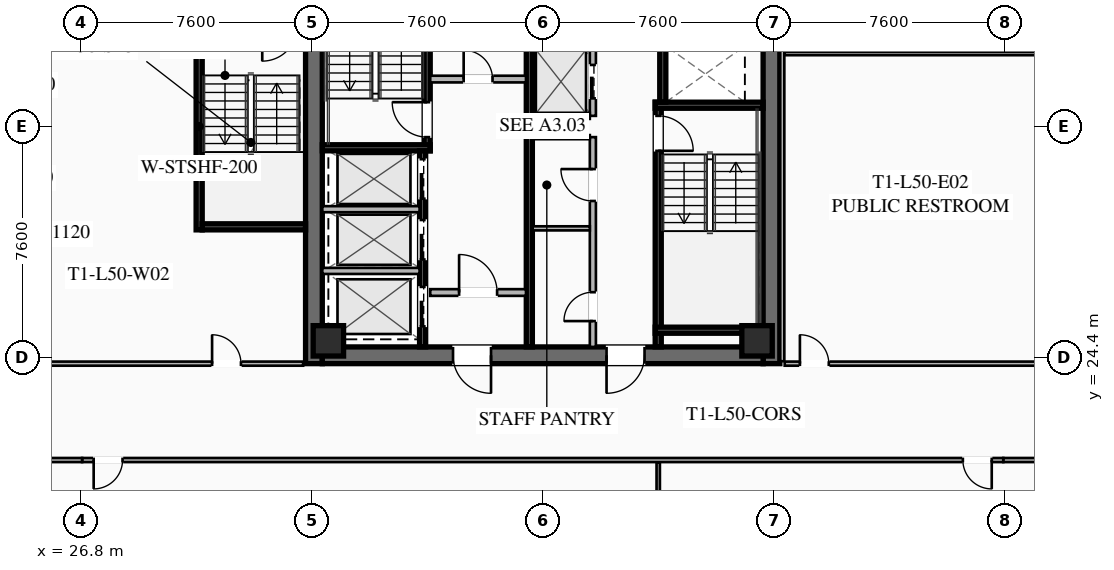
"""IFC4 building model, lengths in metres.
Left out: names, types, materials, properties, quantities, classifications, styles, units other than length and angle.
Written with IfcOpenShell. Run it as: python <this file> out.ifc"""

import sys

from ifc_helpers import new_model, si_unit, direction, frame, frame_2d, origin, origin_2d, place, context, subcontext, project, spatial, rectangle, hollow_rectangle, extrude, element, fill, save


model = new_model("IFC4")
c1 = context("Model", 3, precision=1e-05, world=origin(), true_north=direction((0.0, 1.0)))
c2 = subcontext(c1, "Body", "Model", "MODEL_VIEW")
j1 = project(units=[si_unit("LENGTHUNIT", "METRE"), si_unit("PLANEANGLEUNIT", "RADIAN")], contexts=[c1])
p1 = place(None, origin())
s1 = spatial("IfcSite", under=j1, at=p1, CompositionType="ELEMENT")
p2 = place(p1, origin())
s2 = spatial("IfcBuilding", under=s1, at=p2, CompositionType="ELEMENT")
p3 = place(p2, frame((0.0, 0.0, 185.4)))
s3 = spatial("IfcBuildingStorey", under=s2, at=p3, CompositionType="ELEMENT", Elevation=185.4)
for number, where, z_axis, x_axis in (
    (1, (34.475, 24.2, 0.0), (0.0, 0.0, 1.0), (0.0, 1.0, 0.0)),
    (2, (49.525, 39.8, 0.0), (0.0, 0.0, 1.0), (0.0, -1.0, 0.0)),
):
    element("IfcWall", number, at=place(p3, frame(where, z_axis=z_axis, x_axis=x_axis)), inside=s3, PredefinedType="SHEAR", context=c2, shape_type="SweptSolid", body=[
        extrude(rectangle(XDim=15.6, YDim=0.55, at=frame_2d((7.8, 0.0))), origin(), (0.0, 0.0, 1.0), 3.55),
    ])
p4 = place(p3, frame((49.25, 24.475, 0.0), z_axis=(0.0, 0.0, 1.0), x_axis=(-1.0, 0.0, 0.0)))
e3 = element("IfcWall", 3, at=p4, inside=s3, PredefinedType="SHEAR", context=c2, shape_type="SweptSolid", body=[
    extrude(rectangle(XDim=14.5, YDim=0.55, at=frame_2d((7.25, 0.0))), origin(), (0.0, 0.0, 1.0), 3.55),
])
p5 = place(p4, frame((8.95, 0.0, 0.0)))
e4 = element("IfcOpeningElement", 4, at=p5, cuts=e3, PredefinedType="OPENING", context=c2, shape_type="SweptSolid", body=[
    extrude(rectangle(XDim=1.25, YDim=2.25, at=frame_2d((0.625, 1.125))), frame((0.0, 0.285, 0.0), z_axis=(0.0, -1.0, 0.0), x_axis=(1.0, 0.0, 0.0)), (0.0, 0.0, 1.0), 0.57),
])
p6 = place(p4, frame((3.9, 0.0, 0.0)))
e5 = element("IfcOpeningElement", 5, at=p6, cuts=e3, PredefinedType="OPENING", context=c2, shape_type="SweptSolid", body=[
    extrude(rectangle(XDim=1.25, YDim=2.25, at=frame_2d((0.625, 1.125))), frame((0.0, 0.285, 0.0), z_axis=(0.0, -1.0, 0.0), x_axis=(1.0, 0.0, 0.0)), (0.0, 0.0, 1.0), 0.57),
])
for number, where, z_axis, x_axis in (
    (6, (34.95, 24.95, 0.0), (0.0, 0.0, 1.0), (1.0, 0.0, 0.0)),
    (7, (49.05, 24.95, 0.0), (0.0, 0.0, 1.0), (1.0, 0.0, 0.0)),
):
    element("IfcColumn", number, at=place(p3, frame(where, z_axis=z_axis, x_axis=x_axis)), inside=s3, PredefinedType="COLUMN", context=c2, shape_type="SweptSolid", body=[
        extrude(hollow_rectangle(XDim=1.0, YDim=1.0, WallThickness=0.04, at=origin_2d()), origin(), (0.0, 0.0, 1.0), 3.37),
    ])
p7 = place(p3, frame((38.2, 31.2, 0.0), z_axis=(0.0, 0.0, 1.0), x_axis=(0.0, 1.0, 0.0)))
e8 = element("IfcWall", 8, at=p7, inside=s3, PredefinedType="SHEAR", context=c2, shape_type="SweptSolid", body=[
    extrude(rectangle(XDim=8.05, YDim=0.2, at=frame_2d((4.025, 0.0))), origin(), (0.0, 0.0, 1.0), 3.37),
])
p8 = place(p7, frame((0.45, 0.0, 0.0)))
e9 = element("IfcOpeningElement", 9, at=p8, cuts=e8, PredefinedType="OPENING", context=c2, shape_type="SweptSolid", body=[
    extrude(rectangle(XDim=1.15, YDim=2.2, at=frame_2d((0.575, 1.1))), frame((0.0, 0.11, 0.0), z_axis=(0.0, -1.0, 0.0), x_axis=(1.0, 0.0, 0.0)), (0.0, 0.0, 1.0), 0.22),
])
p9 = place(p3, frame((34.75, 31.3, 0.0), z_axis=(0.0, 0.0, 1.0), x_axis=(1.0, 0.0, 0.0)))
e10 = element("IfcWall", 10, at=p9, inside=s3, PredefinedType="SHEAR", context=c2, shape_type="SweptSolid", body=[
    extrude(rectangle(XDim=3.55, YDim=0.2, at=frame_2d((1.775, 0.0))), origin(), (0.0, 0.0, 1.0), 3.37),
])
p10 = place(p3, frame((45.8, 32.8, 0.0), z_axis=(0.0, 0.0, 1.0), x_axis=(0.0, -1.0, 0.0)))
e11 = element("IfcWall", 11, at=p10, inside=s3, PredefinedType="SHEAR", context=c2, shape_type="SweptSolid", body=[
    extrude(rectangle(XDim=8.05, YDim=0.2, at=frame_2d((4.025, 0.0))), origin(), (0.0, 0.0, 1.0), 3.37),
])
p11 = place(p10, frame((0.45, 0.0, 0.0)))
e12 = element("IfcOpeningElement", 12, at=p11, cuts=e11, PredefinedType="OPENING", context=c2, shape_type="SweptSolid", body=[
    extrude(rectangle(XDim=1.15, YDim=2.2, at=frame_2d((0.575, 1.1))), frame((0.0, 0.11, 0.0), z_axis=(0.0, -1.0, 0.0), x_axis=(1.0, 0.0, 0.0)), (0.0, 0.0, 1.0), 0.22),
])
for number, where, z_axis, x_axis in (
    (13, (45.7, 32.7, 0.0), (0.0, 0.0, 1.0), (1.0, 0.0, 0.0)),
    (14, (45.7, 25.3, 0.0), (0.0, 0.0, 1.0), (1.0, 0.0, 0.0)),
):
    element("IfcWall", number, at=place(p3, frame(where, z_axis=z_axis, x_axis=x_axis)), inside=s3, PredefinedType="SHEAR", context=c2, shape_type="SweptSolid", body=[
        extrude(rectangle(XDim=3.55, YDim=0.2, at=frame_2d((1.775, 0.0))), origin(), (0.0, 0.0, 1.0), 3.37),
    ])
p12 = place(p3, frame((41.56, 24.75, 0.0), z_axis=(0.0, 0.0, 1.0), x_axis=(0.0, 1.0, 0.0)))
e15 = element("IfcWall", 15, at=p12, inside=s3, PredefinedType="SHEAR", context=c2, shape_type="SweptSolid", body=[
    extrude(rectangle(XDim=14.5, YDim=0.2, at=frame_2d((7.25, 0.0))), origin(), (0.0, 0.0, 1.0), 3.37),
])
p13 = place(p3, frame((38.3, 33.56, 0.0), z_axis=(0.0, 0.0, 1.0), x_axis=(1.0, 0.0, 0.0)))
e16 = element("IfcWall", 16, at=p13, inside=s3, PredefinedType="SOLIDWALL", context=c2, shape_type="SweptSolid", body=[
    extrude(rectangle(XDim=3.15, YDim=0.22, at=frame_2d((1.575, 0.0))), origin(), (0.0, 0.0, 1.0), 2.723),
])
p14 = place(p13, frame((1.1, 0.0, 0.0)))
e17 = element("IfcOpeningElement", 17, at=p14, cuts=e16, PredefinedType="OPENING", context=c2, shape_type="SweptSolid", body=[
    extrude(rectangle(XDim=0.95, YDim=2.05, at=frame_2d((0.475, 1.025))), frame((0.0, 0.12, 0.0), z_axis=(0.0, -1.0, 0.0), x_axis=(1.0, 0.0, 0.0)), (0.0, 0.0, 1.0), 0.24),
])
p15 = place(p3, frame((38.3, 26.54, 0.0), z_axis=(0.0, 0.0, 1.0), x_axis=(1.0, 0.0, 0.0)))
e18 = element("IfcWall", 18, at=p15, inside=s3, PredefinedType="SOLIDWALL", context=c2, shape_type="SweptSolid", body=[
    extrude(rectangle(XDim=3.15, YDim=0.22, at=frame_2d((1.575, 0.0))), origin(), (0.0, 0.0, 1.0), 2.723),
])
p16 = place(p15, frame((0.95, 0.0, 0.0)))
e19 = element("IfcOpeningElement", 19, at=p16, cuts=e18, PredefinedType="OPENING", context=c2, shape_type="SweptSolid", body=[
    extrude(rectangle(XDim=1.25, YDim=2.25, at=frame_2d((0.625, 1.125))), frame((0.0, 0.12, 0.0), z_axis=(0.0, -1.0, 0.0), x_axis=(1.0, 0.0, 0.0)), (0.0, 0.0, 1.0), 0.24),
])
p17 = place(p3, frame((38.05, 24.75, 0.0), z_axis=(0.0, 0.0, 1.0), x_axis=(0.0, 1.0, 0.0)))
e20 = element("IfcWall", 20, at=p17, inside=s3, PredefinedType="SHEAR", context=c2, shape_type="SweptSolid", body=[
    extrude(rectangle(XDim=6.45, YDim=0.2, at=frame_2d((3.225, 0.0))), origin(), (0.0, 0.0, 1.0), 3.37),
])
p18 = place(p17, frame((4.875, 0.0, 0.0)))
e21 = element("IfcOpeningElement", 21, at=p18, cuts=e20, PredefinedType="OPENING", context=c2, shape_type="SweptSolid", body=[
    extrude(rectangle(XDim=1.3, YDim=2.25, at=frame_2d((0.65, 1.125))), frame((0.0, 0.11, 0.0), z_axis=(0.0, -1.0, 0.0), x_axis=(1.0, 0.0, 0.0)), (0.0, 0.0, 1.0), 0.22),
])
p19 = place(p17, frame((2.875, 0.0, 0.0)))
e22 = element("IfcOpeningElement", 22, at=p19, cuts=e20, PredefinedType="OPENING", context=c2, shape_type="SweptSolid", body=[
    extrude(rectangle(XDim=1.3, YDim=2.25, at=frame_2d((0.65, 1.125))), frame((0.0, 0.11, 0.0), z_axis=(0.0, -1.0, 0.0), x_axis=(1.0, 0.0, 0.0)), (0.0, 0.0, 1.0), 0.22),
])
p20 = place(p17, frame((0.675, 0.0, 0.0)))
e23 = element("IfcOpeningElement", 23, at=p20, cuts=e20, PredefinedType="OPENING", context=c2, shape_type="SweptSolid", body=[
    extrude(rectangle(XDim=1.3, YDim=2.25, at=frame_2d((0.65, 1.125))), frame((0.0, 0.11, 0.0), z_axis=(0.0, -1.0, 0.0), x_axis=(1.0, 0.0, 0.0)), (0.0, 0.0, 1.0), 0.22),
])
for number, where, z_axis, x_axis in (
    (24, (34.75, 27.25, 0.0), (0.0, 0.0, 1.0), (1.0, 0.0, 0.0)),
    (25, (34.75, 29.28, 0.0), (0.0, 0.0, 1.0), (1.0, 0.0, 0.0)),
):
    element("IfcWall", number, at=place(p3, frame(where, z_axis=z_axis, x_axis=x_axis)), inside=s3, PredefinedType="SOLIDWALL", context=c2, shape_type="SweptSolid", body=[
        extrude(rectangle(XDim=3.2, YDim=0.2, at=frame_2d((1.6, 0.0))), origin(), (0.0, 0.0, 1.0), 3.37),
    ])
p21 = place(p3, frame((45.95, 39.25, 0.0), z_axis=(0.0, 0.0, 1.0), x_axis=(0.0, -1.0, 0.0)))
e26 = element("IfcWall", 26, at=p21, inside=s3, PredefinedType="SHEAR", context=c2, shape_type="SweptSolid", body=[
    extrude(rectangle(XDim=6.45, YDim=0.2, at=frame_2d((3.225, 0.0))), origin(), (0.0, 0.0, 1.0), 3.37),
])
p22 = place(p3, frame((43.65, 24.75, 0.0), z_axis=(0.0, 0.0, 1.0), x_axis=(0.0, 1.0, 0.0)))
e27 = element("IfcWall", 27, at=p22, inside=s3, PredefinedType="SOLIDWALL", context=c2, shape_type="SweptSolid", body=[
    extrude(rectangle(XDim=6.9, YDim=0.2, at=frame_2d((3.45, 0.0))), origin(), (0.0, 0.0, 1.0), 2.723),
])
p23 = place(p22, frame((0.85, 0.0, 0.0)))
e28 = element("IfcOpeningElement", 28, at=p23, cuts=e27, PredefinedType="OPENING", context=c2, shape_type="SweptSolid", body=[
    extrude(rectangle(XDim=0.95, YDim=2.05, at=frame_2d((0.475, 1.025))), frame((0.0, 0.11, 0.0), z_axis=(0.0, -1.0, 0.0), x_axis=(1.0, 0.0, 0.0)), (0.0, 0.0, 1.0), 0.22),
])
p24 = place(p22, frame((4.8, 0.0, 0.0)))
e29 = element("IfcOpeningElement", 29, at=p24, cuts=e27, PredefinedType="OPENING", context=c2, shape_type="SweptSolid", body=[
    extrude(rectangle(XDim=1.05, YDim=2.2, at=frame_2d((0.525, 1.1))), frame((0.0, 0.11, 0.0), z_axis=(0.0, -1.0, 0.0), x_axis=(1.0, 0.0, 0.0)), (0.0, 0.0, 1.0), 0.22),
])
for number, where, z_axis, x_axis in (
    (30, (41.67, 31.65, 0.0), (0.0, 0.0, 1.0), (1.0, 0.0, 0.0)),
    (31, (41.67, 28.65, 0.0), (0.0, 0.0, 1.0), (1.0, 0.0, 0.0)),
):
    element("IfcWall", number, at=place(p3, frame(where, z_axis=z_axis, x_axis=x_axis)), inside=s3, PredefinedType="PARTITIONING", context=c2, shape_type="SweptSolid", body=[
        extrude(rectangle(XDim=1.88, YDim=0.135, at=frame_2d((0.94, 0.0))), origin(), (0.0, 0.0, 1.0), 2.723),
    ])
p25 = place(p3, frame((43.65, 32.35, 0.0), z_axis=(0.0, 0.0, 1.0), x_axis=(0.0, 1.0, 0.0)))
e32 = element("IfcWall", 32, at=p25, inside=s3, PredefinedType="SOLIDWALL", context=c2, shape_type="SweptSolid", body=[
    extrude(rectangle(XDim=6.9, YDim=0.2, at=frame_2d((3.45, 0.0))), origin(), (0.0, 0.0, 1.0), 3.37),
])
p26 = place(p25, frame((0.575, 0.0, 0.0)))
e33 = element("IfcOpeningElement", 33, at=p26, cuts=e32, PredefinedType="OPENING", context=c2, shape_type="SweptSolid", body=[
    extrude(rectangle(XDim=1.1, YDim=2.2, at=frame_2d((0.55, 1.1))), frame((0.0, 0.11, 0.0), z_axis=(0.0, -1.0, 0.0), x_axis=(1.0, 0.0, 0.0)), (0.0, 0.0, 1.0), 0.22),
])
p27 = place(p25, frame((2.825, 0.0, 0.0)))
e34 = element("IfcOpeningElement", 34, at=p27, cuts=e32, PredefinedType="OPENING", context=c2, shape_type="SweptSolid", body=[
    extrude(rectangle(XDim=1.1, YDim=2.2, at=frame_2d((0.55, 1.1))), frame((0.0, 0.11, 0.0), z_axis=(0.0, -1.0, 0.0), x_axis=(1.0, 0.0, 0.0)), (0.0, 0.0, 1.0), 0.22),
])
p28 = place(p25, frame((5.075, 0.0, 0.0)))
e35 = element("IfcOpeningElement", 35, at=p28, cuts=e32, PredefinedType="OPENING", context=c2, shape_type="SweptSolid", body=[
    extrude(rectangle(XDim=1.1, YDim=2.2, at=frame_2d((0.55, 1.1))), frame((0.0, 0.11, 0.0), z_axis=(0.0, -1.0, 0.0), x_axis=(1.0, 0.0, 0.0)), (0.0, 0.0, 1.0), 0.22),
])
p29 = place(p3, frame((41.67, 32.35, 0.0), z_axis=(0.0, 0.0, 1.0), x_axis=(1.0, 0.0, 0.0)))
e36 = element("IfcWall", 36, at=p29, inside=s3, PredefinedType="SOLIDWALL", context=c2, shape_type="SweptSolid", body=[
    extrude(rectangle(XDim=1.88, YDim=0.2, at=frame_2d((0.94, 0.0))), origin(), (0.0, 0.0, 1.0), 3.37),
])
p30 = place(p3, frame((30.7, 28.6, 0.0), z_axis=(0.0, 0.0, 1.0), x_axis=(0.0, 1.0, 0.0)))
e37 = element("IfcWall", 37, at=p30, inside=s3, PredefinedType="SHEAR", context=c2, shape_type="SweptSolid", body=[
    extrude(rectangle(XDim=6.8, YDim=0.2, at=frame_2d((3.4, 0.0))), origin(), (0.0, 0.0, 1.0), 3.37),
])
p31 = place(p3, frame((30.8, 28.7, 0.0), z_axis=(0.0, 0.0, 1.0), x_axis=(1.0, 0.0, 0.0)))
e38 = element("IfcWall", 38, at=p31, inside=s3, PredefinedType="SHEAR", context=c2, shape_type="SweptSolid", body=[
    extrude(rectangle(XDim=3.4, YDim=0.2, at=frame_2d((1.7, 0.0))), origin(), (0.0, 0.0, 1.0), 3.37),
])
p32 = place(p3, frame((57.15, 21.03, 0.0), z_axis=(0.0, 0.0, 1.0), x_axis=(-1.0, 0.0, 0.0)))
e39 = element("IfcWall", 39, at=p32, inside=s3, PredefinedType="PARTITIONING", context=c2, shape_type="SweptSolid", body=[
    extrude(rectangle(XDim=30.3, YDim=0.135, at=frame_2d((15.15, 0.0))), origin(), (0.0, 0.0, 1.0), 2.723),
])
p33 = place(p32, frame((28.97, 0.0, 0.0)))
e40 = element("IfcOpeningElement", 40, at=p33, cuts=e39, PredefinedType="OPENING", context=c2, shape_type="SweptSolid", body=[
    extrude(rectangle(XDim=0.95, YDim=2.05, at=frame_2d((0.475, 1.025))), frame((0.0, 0.077, 0.0), z_axis=(0.0, -1.0, 0.0), x_axis=(1.0, 0.0, 0.0)), (0.0, 0.0, 1.0), 0.155),
])
p34 = place(p32, frame((0.38, 0.0, 0.0)))
e41 = element("IfcOpeningElement", 41, at=p34, cuts=e39, PredefinedType="OPENING", context=c2, shape_type="SweptSolid", body=[
    extrude(rectangle(XDim=0.95, YDim=2.05, at=frame_2d((0.475, 1.025))), frame((0.0, 0.077, 0.0), z_axis=(0.0, -1.0, 0.0), x_axis=(1.0, 0.0, 0.0)), (0.0, 0.0, 1.0), 0.155),
])
for number, where, z_axis, x_axis in (
    (42, (24.32, 21.03, 0.0), (0.0, 0.0, 1.0), (1.0, 0.0, 0.0)),
    (43, (57.15, 21.03, 0.0), (0.0, 0.0, 1.0), (1.0, 0.0, 0.0)),
):
    element("IfcWall", number, at=place(p3, frame(where, z_axis=z_axis, x_axis=x_axis)), inside=s3, PredefinedType="PARTITIONING", context=c2, shape_type="SweptSolid", body=[
        extrude(rectangle(XDim=2.53, YDim=0.135, at=frame_2d((1.265, 0.0))), origin(), (0.0, 0.0, 1.0), 2.723),
    ])
p35 = place(p3, frame((45.8, 14.32, 0.0), z_axis=(0.0, 0.0, 1.0), x_axis=(0.0, 1.0, 0.0)))
e44 = element("IfcWall", 44, at=p35, inside=s3, PredefinedType="PARTITIONING", context=c2, shape_type="SweptSolid", body=[
    extrude(rectangle(XDim=6.63, YDim=0.11, at=frame_2d((3.315, 0.0))), origin(), (0.0, 0.0, 1.0), 2.723),
])
p36 = place(p3, frame((49.88, 39.72, 0.0), z_axis=(0.0, 0.0, 1.0), x_axis=(0.0, -1.0, 0.0)))
e45 = element("IfcWall", 45, at=p36, inside=s3, PredefinedType="PARTITIONING", context=c2, shape_type="SweptSolid", body=[
    extrude(rectangle(XDim=15.44, YDim=0.135, at=frame_2d((7.72, 0.0))), origin(), (0.0, 0.0, 1.0), 2.723),
])
p37 = place(p3, frame((49.96, 24.2, 0.0), z_axis=(0.0, 0.0, 1.0), x_axis=(1.0, 0.0, 0.0)))
e46 = element("IfcWall", 46, at=p37, inside=s3, PredefinedType="PARTITIONING", context=c2, shape_type="SweptSolid", body=[
    extrude(rectangle(XDim=9.72, YDim=0.135, at=frame_2d((4.86, 0.0))), origin(), (0.0, 0.0, 1.0), 2.723),
])
p38 = place(p37, frame((0.5, 0.0, 0.0)))
e47 = element("IfcOpeningElement", 47, at=p38, cuts=e46, PredefinedType="OPENING", context=c2, shape_type="SweptSolid", body=[
    extrude(rectangle(XDim=0.95, YDim=2.05, at=frame_2d((0.475, 1.025))), frame((0.0, 0.077, 0.0), z_axis=(0.0, -1.0, 0.0), x_axis=(1.0, 0.0, 0.0)), (0.0, 0.0, 1.0), 0.155),
])
p39 = place(p3, frame((49.96, 34.4, 0.0), z_axis=(0.0, 0.0, 1.0), x_axis=(1.0, 0.0, 0.0)))
e48 = element("IfcWall", 48, at=p39, inside=s3, PredefinedType="PARTITIONING", context=c2, shape_type="SweptSolid", body=[
    extrude(rectangle(XDim=9.72, YDim=0.11, at=frame_2d((4.86, 0.0))), origin(), (0.0, 0.0, 1.0), 2.723),
])
p40 = place(p3, frame((24.47, 24.2, 0.0), z_axis=(0.0, 0.0, 1.0), x_axis=(1.0, 0.0, 0.0)))
e49 = element("IfcWall", 49, at=p40, inside=s3, PredefinedType="PARTITIONING", context=c2, shape_type="SweptSolid", body=[
    extrude(rectangle(XDim=9.65, YDim=0.135, at=frame_2d((4.825, 0.0))), origin(), (0.0, 0.0, 1.0), 2.723),
])
p41 = place(p40, frame((6.655, 0.0, 0.0)))
e50 = element("IfcOpeningElement", 50, at=p41, cuts=e49, PredefinedType="OPENING", context=c2, shape_type="SweptSolid", body=[
    extrude(rectangle(XDim=0.95, YDim=2.05, at=frame_2d((0.475, 1.025))), frame((0.0, 0.077, 0.0), z_axis=(0.0, -1.0, 0.0), x_axis=(1.0, 0.0, 0.0)), (0.0, 0.0, 1.0), 0.155),
])
p42 = place(p5, origin())
e51 = element("IfcDoor", 51, at=p42, inside=s3, OperationType="SINGLE_SWING_LEFT", PredefinedType="DOOR", context=c2, shape_type="SweptSolid", body=[
    extrude(rectangle(XDim=1.25, YDim=2.25, at=frame_2d((0.625, 1.125))), frame((0.0, 0.025, 0.0), z_axis=(0.0, -1.0, 0.0), x_axis=(1.0, 0.0, 0.0)), (0.0, 0.0, 1.0), 0.05),
])
fill(e4, e51)
p43 = place(p6, origin())
e52 = element("IfcDoor", 52, at=p43, inside=s3, OperationType="SINGLE_SWING_RIGHT", PredefinedType="DOOR", context=c2, shape_type="SweptSolid", body=[
    extrude(rectangle(XDim=1.25, YDim=2.25, at=frame_2d((0.625, 1.125))), frame((0.0, 0.025, 0.0), z_axis=(0.0, -1.0, 0.0), x_axis=(1.0, 0.0, 0.0)), (0.0, 0.0, 1.0), 0.05),
])
fill(e5, e52)
p44 = place(p8, origin())
e53 = element("IfcDoor", 53, at=p44, inside=s3, OperationType="SINGLE_SWING_RIGHT", PredefinedType="DOOR", context=c2, shape_type="SweptSolid", body=[
    extrude(rectangle(XDim=1.15, YDim=2.2, at=frame_2d((0.575, 1.1))), frame((0.0, 0.025, 0.0), z_axis=(0.0, -1.0, 0.0), x_axis=(1.0, 0.0, 0.0)), (0.0, 0.0, 1.0), 0.05),
])
fill(e9, e53)
p45 = place(p11, origin())
e54 = element("IfcDoor", 54, at=p45, inside=s3, OperationType="SINGLE_SWING_RIGHT", PredefinedType="DOOR", context=c2, shape_type="SweptSolid", body=[
    extrude(rectangle(XDim=1.15, YDim=2.2, at=frame_2d((0.575, 1.1))), frame((0.0, 0.025, 0.0), z_axis=(0.0, -1.0, 0.0), x_axis=(1.0, 0.0, 0.0)), (0.0, 0.0, 1.0), 0.05),
])
fill(e12, e54)
p46 = place(p16, origin())
e55 = element("IfcDoor", 55, at=p46, inside=s3, OperationType="SINGLE_SWING_LEFT", PredefinedType="DOOR", context=c2, shape_type="SweptSolid", body=[
    extrude(rectangle(XDim=1.25, YDim=2.25, at=frame_2d((0.625, 1.125))), frame((0.0, 0.025, 0.0), z_axis=(0.0, -1.0, 0.0), x_axis=(1.0, 0.0, 0.0)), (0.0, 0.0, 1.0), 0.05),
])
fill(e19, e55)
p47 = place(p14, origin())
e56 = element("IfcDoor", 56, at=p47, inside=s3, OperationType="SINGLE_SWING_LEFT", PredefinedType="DOOR", context=c2, shape_type="SweptSolid", body=[
    extrude(rectangle(XDim=0.95, YDim=2.05, at=frame_2d((0.475, 1.025))), frame((0.0, 0.025, 0.0), z_axis=(0.0, -1.0, 0.0), x_axis=(1.0, 0.0, 0.0)), (0.0, 0.0, 1.0), 0.05),
])
fill(e17, e56)
p48 = place(p23, origin())
e57 = element("IfcDoor", 57, at=p48, inside=s3, OperationType="SINGLE_SWING_LEFT", PredefinedType="DOOR", context=c2, shape_type="SweptSolid", body=[
    extrude(rectangle(XDim=0.95, YDim=2.05, at=frame_2d((0.475, 1.025))), frame((0.0, 0.025, 0.0), z_axis=(0.0, -1.0, 0.0), x_axis=(1.0, 0.0, 0.0)), (0.0, 0.0, 1.0), 0.05),
])
fill(e28, e57)
p49 = place(p24, origin())
e58 = element("IfcDoor", 58, at=p49, inside=s3, OperationType="SINGLE_SWING_RIGHT", PredefinedType="DOOR", context=c2, shape_type="SweptSolid", body=[
    extrude(rectangle(XDim=1.05, YDim=2.2, at=frame_2d((0.525, 1.1))), frame((0.0, 0.025, 0.0), z_axis=(0.0, -1.0, 0.0), x_axis=(1.0, 0.0, 0.0)), (0.0, 0.0, 1.0), 0.05),
])
fill(e29, e58)
p50 = place(p33, origin())
e59 = element("IfcDoor", 59, at=p50, inside=s3, OperationType="SINGLE_SWING_RIGHT", PredefinedType="DOOR", context=c2, shape_type="SweptSolid", body=[
    extrude(rectangle(XDim=0.95, YDim=2.05, at=frame_2d((0.475, 1.025))), frame((0.0, 0.025, 0.0), z_axis=(0.0, -1.0, 0.0), x_axis=(1.0, 0.0, 0.0)), (0.0, 0.0, 1.0), 0.05),
])
fill(e40, e59)
p51 = place(p34, origin())
e60 = element("IfcDoor", 60, at=p51, inside=s3, OperationType="SINGLE_SWING_LEFT", PredefinedType="DOOR", context=c2, shape_type="SweptSolid", body=[
    extrude(rectangle(XDim=0.95, YDim=2.05, at=frame_2d((0.475, 1.025))), frame((0.0, 0.025, 0.0), z_axis=(0.0, -1.0, 0.0), x_axis=(1.0, 0.0, 0.0)), (0.0, 0.0, 1.0), 0.05),
])
fill(e41, e60)
p52 = place(p38, origin())
e61 = element("IfcDoor", 61, at=p52, inside=s3, OperationType="SINGLE_SWING_LEFT", PredefinedType="DOOR", context=c2, shape_type="SweptSolid", body=[
    extrude(rectangle(XDim=0.95, YDim=2.05, at=frame_2d((0.475, 1.025))), frame((0.0, 0.025, 0.0), z_axis=(0.0, -1.0, 0.0), x_axis=(1.0, 0.0, 0.0)), (0.0, 0.0, 1.0), 0.05),
])
fill(e47, e61)
p53 = place(p41, origin())
e62 = element("IfcDoor", 62, at=p53, inside=s3, OperationType="SINGLE_SWING_LEFT", PredefinedType="DOOR", context=c2, shape_type="SweptSolid", body=[
    extrude(rectangle(XDim=0.95, YDim=2.05, at=frame_2d((0.475, 1.025))), frame((0.0, 0.025, 0.0), z_axis=(0.0, -1.0, 0.0), x_axis=(1.0, 0.0, 0.0)), (0.0, 0.0, 1.0), 0.05),
])
fill(e50, e62)
p54 = place(p18, origin())
e63 = element("IfcDoor", 63, at=p54, inside=s3, OperationType="SLIDING_TO_LEFT", PredefinedType="DOOR", context=c2, shape_type="SweptSolid", body=[
    extrude(rectangle(XDim=1.3, YDim=2.25, at=frame_2d((0.65, 1.125))), frame((0.0, 0.025, 0.0), z_axis=(0.0, -1.0, 0.0), x_axis=(1.0, 0.0, 0.0)), (0.0, 0.0, 1.0), 0.05),
])
fill(e21, e63)
p55 = place(p19, origin())
e64 = element("IfcDoor", 64, at=p55, inside=s3, OperationType="SLIDING_TO_LEFT", PredefinedType="DOOR", context=c2, shape_type="SweptSolid", body=[
    extrude(rectangle(XDim=1.3, YDim=2.25, at=frame_2d((0.65, 1.125))), frame((0.0, 0.025, 0.0), z_axis=(0.0, -1.0, 0.0), x_axis=(1.0, 0.0, 0.0)), (0.0, 0.0, 1.0), 0.05),
])
fill(e22, e64)
p56 = place(p20, origin())
e65 = element("IfcDoor", 65, at=p56, inside=s3, OperationType="SLIDING_TO_LEFT", PredefinedType="DOOR", context=c2, shape_type="SweptSolid", body=[
    extrude(rectangle(XDim=1.3, YDim=2.25, at=frame_2d((0.65, 1.125))), frame((0.0, 0.025, 0.0), z_axis=(0.0, -1.0, 0.0), x_axis=(1.0, 0.0, 0.0)), (0.0, 0.0, 1.0), 0.05),
])
fill(e23, e65)
p57 = place(p26, origin())
e66 = element("IfcDoor", 66, at=p57, inside=s3, OperationType="SLIDING_TO_LEFT", PredefinedType="DOOR", context=c2, shape_type="SweptSolid", body=[
    extrude(rectangle(XDim=1.1, YDim=2.2, at=frame_2d((0.55, 1.1))), frame((0.0, 0.025, 0.0), z_axis=(0.0, -1.0, 0.0), x_axis=(1.0, 0.0, 0.0)), (0.0, 0.0, 1.0), 0.05),
])
fill(e33, e66)
save(model, sys.argv[1])
